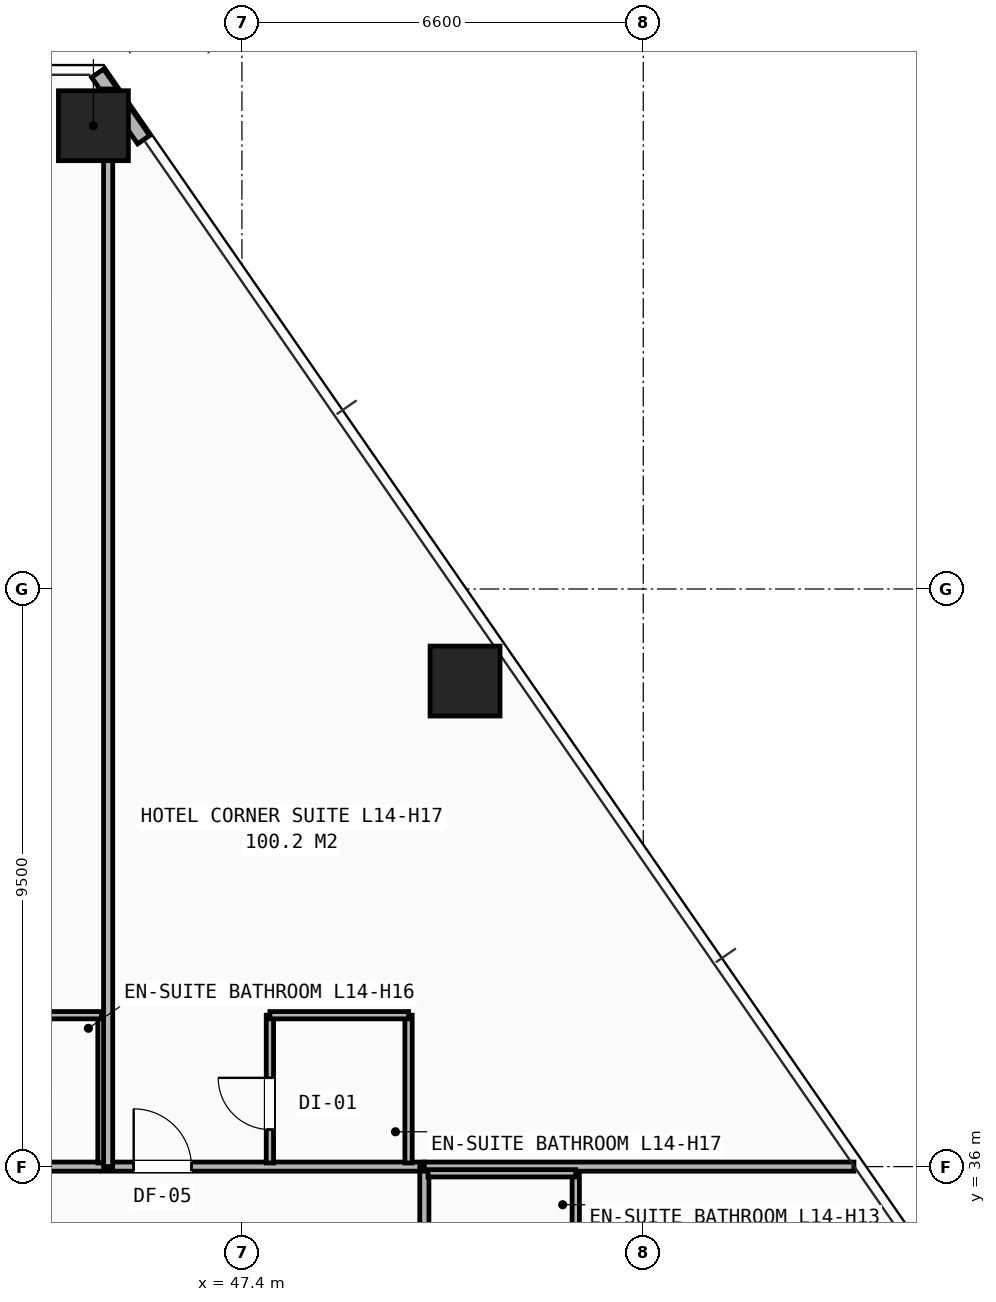
"""IFC4 building model, lengths in metres.
Left out: names, types, materials, properties, quantities, classifications, styles, units other than length and angle.
Written with IfcOpenShell. Run it as: python <this file> out.ifc"""

import sys

from ifc_helpers import new_model, si_unit, direction, frame, frame_2d, origin, origin_2d, place, context, subcontext, project, spatial, rectangle, hollow_rectangle, extrude, element, fill, save


model = new_model("IFC4")
c1 = context("Model", 3, precision=1e-05, world=origin(), true_north=direction((0.0, 1.0)))
c2 = subcontext(c1, "Body", "Model", "MODEL_VIEW")
j1 = project(units=[si_unit("LENGTHUNIT", "METRE"), si_unit("PLANEANGLEUNIT", "RADIAN")], contexts=[c1])
p1 = place(None, origin())
s1 = spatial("IfcSite", under=j1, at=p1, CompositionType="ELEMENT")
p2 = place(p1, origin())
s2 = spatial("IfcBuilding", under=s1, at=p2, CompositionType="ELEMENT")
p3 = place(p2, frame((0.0, 0.0, 52.8)))
s3 = spatial("IfcBuildingStorey", under=s2, at=p3, CompositionType="ELEMENT", Elevation=52.8)
for number, where, z_axis, x_axis in (
    (1, (44.958, 53.12, 0.0), (0.0, 0.0, 1.0), (1.0, 0.0, 0.0)),
    (2, (51.069, 43.986, 0.0), (0.0, 0.0, 1.0), (1.0, 0.0, 0.0)),
):
    element("IfcColumn", number, at=place(p3, frame(where, z_axis=z_axis, x_axis=x_axis)), inside=s3, PredefinedType="COLUMN", context=c2, shape_type="SweptSolid", body=[
        extrude(hollow_rectangle(XDim=1.15, YDim=1.15, WallThickness=0.075, at=origin_2d()), origin(), (0.0, 0.0, 1.0), 3.2),
    ])
p4 = place(p3, frame((45.784, 52.889, 0.0), z_axis=(0.0, 0.0, 1.0), x_axis=(-0.569066739455, 0.82229133891, 0.0)))
e3 = element("IfcWall", 3, at=p4, inside=s3, PredefinedType="SHEAR", context=c2, shape_type="SweptSolid", body=[
    extrude(rectangle(XDim=1.33, YDim=0.24, at=frame_2d((0.665, 0.0))), origin(), (0.0, 0.0, 1.0), 2.263),
])
p5 = place(p3, frame((41.275, 36.0, 0.0), z_axis=(0.0, 0.0, 1.0), x_axis=(1.0, 0.0, 0.0)))
e4 = element("IfcWall", 4, at=p5, inside=s3, PredefinedType="PARTITIONING", context=c2, shape_type="SweptSolid", body=[
    extrude(rectangle(XDim=9.125, YDim=0.15, at=frame_2d((4.562, 0.0))), origin(), (0.0, 0.0, 1.0), 2.513),
])
p6 = place(p5, frame((0.2, 0.0, 0.0)))
e5 = element("IfcOpeningElement", 5, at=p6, cuts=e4, PredefinedType="OPENING", context=c2, shape_type="SweptSolid", body=[
    extrude(rectangle(XDim=0.95, YDim=2.1, at=frame_2d((0.475, 1.05))), frame((0.0, 0.085, 0.0), z_axis=(0.0, -1.0, 0.0), x_axis=(1.0, 0.0, 0.0)), (0.0, 0.0, 1.0), 0.17),
])
p7 = place(p5, frame((4.345, 0.0, 0.0)))
e6 = element("IfcOpeningElement", 6, at=p7, cuts=e4, PredefinedType="OPENING", context=c2, shape_type="SweptSolid", body=[
    extrude(rectangle(XDim=0.95, YDim=2.1, at=frame_2d((0.475, 1.05))), frame((0.0, 0.085, 0.0), z_axis=(0.0, -1.0, 0.0), x_axis=(1.0, 0.0, 0.0)), (0.0, 0.0, 1.0), 0.17),
])
p8 = place(p3, frame((50.4, 14.1, 0.0), z_axis=(0.0, 0.0, 1.0), x_axis=(0.0, 1.0, 0.0)))
e7 = element("IfcWall", 7, at=p8, inside=s3, PredefinedType="PARTITIONING", context=c2, shape_type="SweptSolid", body=[
    extrude(rectangle(XDim=21.9, YDim=0.15, at=frame_2d((10.95, 0.0))), origin(), (0.0, 0.0, 1.0), 2.191),
])
p9 = place(p8, frame((0.42, 0.0, 0.0)))
e8 = element("IfcOpeningElement", 8, at=p9, cuts=e7, PredefinedType="OPENING", context=c2, shape_type="SweptSolid", body=[
    extrude(rectangle(XDim=0.95, YDim=2.1, at=frame_2d((0.475, 1.05))), frame((0.0, 0.085, 0.0), z_axis=(0.0, -1.0, 0.0), x_axis=(1.0, 0.0, 0.0)), (0.0, 0.0, 1.0), 0.17),
])
p10 = place(p8, frame((5.72, 0.0, 0.0)))
e9 = element("IfcOpeningElement", 9, at=p10, cuts=e7, PredefinedType="OPENING", context=c2, shape_type="SweptSolid", body=[
    extrude(rectangle(XDim=0.95, YDim=2.1, at=frame_2d((0.475, 1.05))), frame((0.0, 0.085, 0.0), z_axis=(0.0, -1.0, 0.0), x_axis=(1.0, 0.0, 0.0)), (0.0, 0.0, 1.0), 0.17),
])
p11 = place(p8, frame((11.12, 0.0, 0.0)))
e10 = element("IfcOpeningElement", 10, at=p11, cuts=e7, PredefinedType="OPENING", context=c2, shape_type="SweptSolid", body=[
    extrude(rectangle(XDim=0.95, YDim=2.1, at=frame_2d((0.475, 1.05))), frame((0.0, 0.085, 0.0), z_axis=(0.0, -1.0, 0.0), x_axis=(1.0, 0.0, 0.0)), (0.0, 0.0, 1.0), 0.17),
])
p12 = place(p8, frame((16.72, 0.0, 0.0)))
e11 = element("IfcOpeningElement", 11, at=p12, cuts=e7, PredefinedType="OPENING", context=c2, shape_type="SweptSolid", body=[
    extrude(rectangle(XDim=0.95, YDim=2.1, at=frame_2d((0.475, 1.05))), frame((0.0, 0.085, 0.0), z_axis=(0.0, -1.0, 0.0), x_axis=(1.0, 0.0, 0.0)), (0.0, 0.0, 1.0), 0.17),
])
p13 = place(p3, frame((50.4, 36.0, 0.0), z_axis=(0.0, 0.0, 1.0), x_axis=(1.0, 0.0, 0.0)))
e12 = element("IfcWall", 12, at=p13, inside=s3, PredefinedType="PARTITIONING", context=c2, shape_type="SweptSolid", body=[
    extrude(rectangle(XDim=7.065, YDim=0.15, at=frame_2d((3.533, 0.0))), origin(), (0.0, 0.0, 1.0), 2.268),
])
p14 = place(p3, frame((52.89, 33.61, 0.0), z_axis=(0.0, 0.0, 1.0), x_axis=(0.0, 1.0, 0.0)))
e13 = element("IfcWall", 13, at=p14, inside=s3, PredefinedType="PARTITIONING", context=c2, shape_type="SweptSolid", body=[
    extrude(rectangle(XDim=2.28, YDim=0.12, at=frame_2d((1.14, 0.0))), origin(), (0.0, 0.0, 1.0), 2.98),
])
p15 = place(p3, frame((50.46, 35.89, 0.0), z_axis=(0.0, 0.0, 1.0), x_axis=(1.0, 0.0, 0.0)))
e14 = element("IfcWall", 14, at=p15, inside=s3, PredefinedType="PARTITIONING", context=c2, shape_type="SweptSolid", body=[
    extrude(rectangle(XDim=2.43, YDim=0.12, at=frame_2d((1.215, 0.0))), origin(), (0.0, 0.0, 1.0), 2.513),
])
p16 = place(p3, frame((45.09, 36.06, 0.0), z_axis=(0.0, 0.0, 1.0), x_axis=(0.0, 1.0, 0.0)))
e15 = element("IfcWall", 15, at=p16, inside=s3, PredefinedType="PARTITIONING", context=c2, shape_type="SweptSolid", body=[
    extrude(rectangle(XDim=2.43, YDim=0.12, at=frame_2d((1.215, 0.0))), origin(), (0.0, 0.0, 1.0), 2.98),
])
p17 = place(p3, frame((42.81, 38.49, 0.0), z_axis=(0.0, 0.0, 1.0), x_axis=(1.0, 0.0, 0.0)))
e16 = element("IfcWall", 16, at=p17, inside=s3, PredefinedType="PARTITIONING", context=c2, shape_type="SweptSolid", body=[
    extrude(rectangle(XDim=2.28, YDim=0.12, at=frame_2d((1.14, 0.0))), origin(), (0.0, 0.0, 1.0), 2.98),
])
p18 = place(p3, frame((45.2, 36.0, 0.0), z_axis=(0.0, 0.0, 1.0), x_axis=(0.0, 1.0, 0.0)))
e17 = element("IfcWall", 17, at=p18, inside=s3, PredefinedType="PARTITIONING", context=c2, shape_type="SweptSolid", body=[
    extrude(rectangle(XDim=17.724, YDim=0.15, at=frame_2d((8.862, 0.0))), origin(), (0.0, 0.0, 1.0), 2.191),
])
p19 = place(p3, frame((47.86, 36.06, 0.0), z_axis=(0.0, 0.0, 1.0), x_axis=(0.0, 1.0, 0.0)))
e18 = element("IfcWall", 18, at=p19, inside=s3, PredefinedType="PARTITIONING", context=c2, shape_type="SweptSolid", body=[
    extrude(rectangle(XDim=2.43, YDim=0.12, at=frame_2d((1.215, 0.0))), origin(), (0.0, 0.0, 1.0), 2.98),
])
p20 = place(p19, frame((0.55, 0.0, 0.0)))
e19 = element("IfcOpeningElement", 19, at=p20, cuts=e18, PredefinedType="OPENING", context=c2, shape_type="SweptSolid", body=[
    extrude(rectangle(XDim=0.85, YDim=2.05, at=frame_2d((0.425, 1.025))), frame((0.0, 0.07, 0.0), z_axis=(0.0, -1.0, 0.0), x_axis=(1.0, 0.0, 0.0)), (0.0, 0.0, 1.0), 0.14),
])
p21 = place(p3, frame((50.14, 36.06, 0.0), z_axis=(0.0, 0.0, 1.0), x_axis=(0.0, 1.0, 0.0)))
e20 = element("IfcWall", 20, at=p21, inside=s3, PredefinedType="PARTITIONING", context=c2, shape_type="SweptSolid", body=[
    extrude(rectangle(XDim=2.43, YDim=0.12, at=frame_2d((1.215, 0.0))), origin(), (0.0, 0.0, 1.0), 2.513),
])
p22 = place(p3, frame((47.86, 38.49, 0.0), z_axis=(0.0, 0.0, 1.0), x_axis=(1.0, 0.0, 0.0)))
e21 = element("IfcWall", 21, at=p22, inside=s3, PredefinedType="PARTITIONING", context=c2, shape_type="SweptSolid", body=[
    extrude(rectangle(XDim=2.28, YDim=0.12, at=frame_2d((1.14, 0.0))), origin(), (0.0, 0.0, 1.0), 2.513),
])
p23 = place(p7, origin())
e22 = element("IfcDoor", 22, at=p23, inside=s3, OperationType="SINGLE_SWING_LEFT", PredefinedType="DOOR", context=c2, shape_type="SweptSolid", body=[
    extrude(rectangle(XDim=0.95, YDim=2.1, at=frame_2d((0.475, 1.05))), frame((0.0, 0.025, 0.0), z_axis=(0.0, -1.0, 0.0), x_axis=(1.0, 0.0, 0.0)), (0.0, 0.0, 1.0), 0.05),
])
fill(e6, e22)
p24 = place(p20, origin())
e23 = element("IfcDoor", 23, at=p24, inside=s3, OperationType="SINGLE_SWING_RIGHT", PredefinedType="DOOR", context=c2, shape_type="SweptSolid", body=[
    extrude(rectangle(XDim=0.85, YDim=2.05, at=frame_2d((0.425, 1.025))), frame((0.0, 0.025, 0.0), z_axis=(0.0, -1.0, 0.0), x_axis=(1.0, 0.0, 0.0)), (0.0, 0.0, 1.0), 0.05),
])
fill(e19, e23)
save(model, sys.argv[1])
